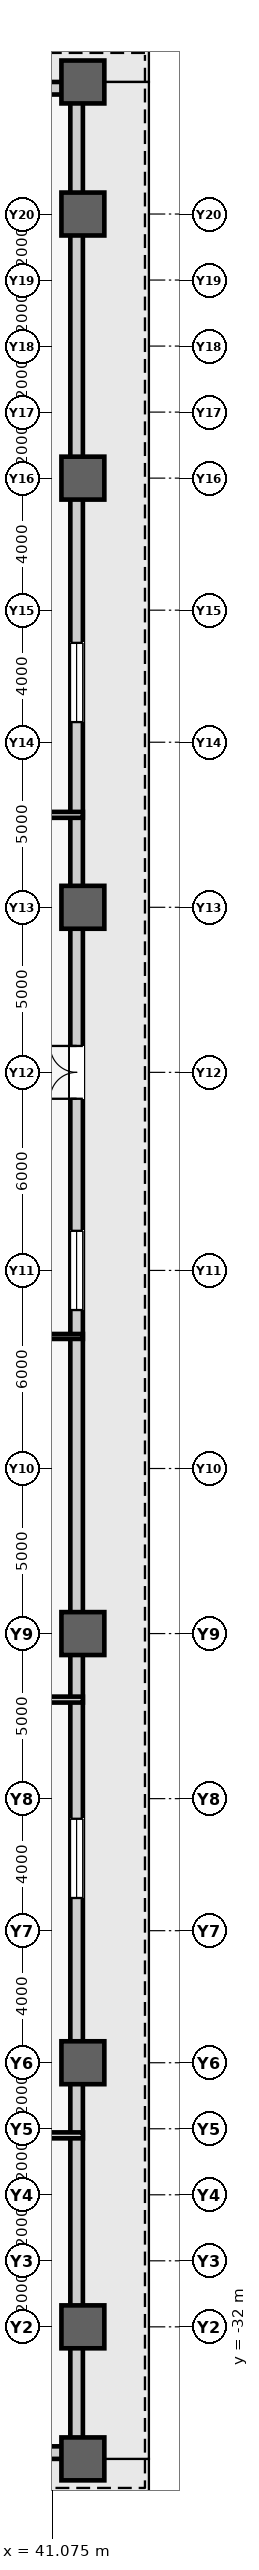
"""IFC4 building model, lengths in metres.
Left out: names, types, materials, properties, quantities, classifications, styles, units other than length and angle.
Written with IfcOpenShell. Run it as: python <this file> out.ifc"""

import sys

from ifc_helpers import new_model, si_unit, direction, frame, frame_2d, origin, origin_2d, place, context, subcontext, project, spatial, rectangle, extrude, source, transform, mapped, element, fill, save


model = new_model("IFC4")
c1 = context("Model", 3, precision=1e-05, world=origin(), true_north=direction((0.0, 1.0)))
c2 = subcontext(c1, "Body", "Model", "MODEL_VIEW")
j1 = project(units=[si_unit("LENGTHUNIT", "METRE"), si_unit("PLANEANGLEUNIT", "RADIAN")], contexts=[c1])
p1 = place(None, origin())
s1 = spatial("IfcSite", under=j1, at=p1, CompositionType="ELEMENT")
p2 = place(p1, origin())
s2 = spatial("IfcBuilding", under=s1, at=p2, CompositionType="ELEMENT")
p3 = place(p2, frame((0.0, 0.0, 12.0)))
s3 = spatial("IfcBuildingStorey", under=s2, at=p3, CompositionType="ELEMENT", Elevation=12.0)
m1 = source(origin(), c2, "Body", "SweptSolid", [
    extrude(rectangle(XDim=1.3, YDim=1.3, at=origin_2d()), origin(), (0.0, 0.0, 1.0), 5.4),
])
for number, where, z_axis, x_axis in (
    (1, (42.0, -36.0, 0.0), (0.0, 0.0, 1.0), (1.0, 0.0, 0.0)),
    (2, (42.0, -24.0, 0.0), (0.0, 0.0, 1.0), (1.0, 0.0, 0.0)),
    (3, (42.0, -11.0, 0.0), (0.0, 0.0, 1.0), (1.0, 0.0, 0.0)),
    (4, (42.0, 11.0, 0.0), (0.0, 0.0, 1.0), (1.0, 0.0, 0.0)),
    (5, (42.0, 24.0, 0.0), (0.0, 0.0, 1.0), (1.0, 0.0, 0.0)),
    (6, (42.0, 36.0, 0.0), (0.0, 0.0, 1.0), (1.0, 0.0, 0.0)),
    (7, (42.0, -32.0, 0.0), (0.0, 0.0, 1.0), (1.0, 0.0, 0.0)),
    (8, (42.0, 32.0, 0.0), (0.0, 0.0, 1.0), (1.0, 0.0, 0.0)),
):
    element("IfcColumn", number, at=place(p3, frame(where, z_axis=z_axis, x_axis=x_axis)), inside=s3, PredefinedType="COLUMN", context=c2, shape_type="MappedRepresentation", body=[
        mapped(m1, transform((0.0, 0.0, 0.0), scale=1.0)),
    ])
m2 = source(origin(), c2, "Body", "SweptSolid", [
    extrude(rectangle(XDim=32.0, YDim=0.38, at=frame_2d((16.0, 0.0))), origin(), (0.0, 0.0, 1.0), 3.28),
])
p4 = place(p3, frame((10.0, -35.81, 0.0), z_axis=(0.0, 0.0, 1.0), x_axis=(1.0, 0.0, 0.0)))
e9 = element("IfcWall", 9, at=p4, inside=s3, PredefinedType="STANDARD", context=c2, shape_type="MappedRepresentation", body=[
    mapped(m2, transform((0.0, 0.0, 0.0), scale=1.0)),
])
m3 = source(origin(), c2, "Body", "SweptSolid", [
    extrude(rectangle(XDim=2.4, YDim=2.56, at=frame_2d((1.2, 1.28))), frame((0.0, 0.2, 0.0), z_axis=(0.0, -1.0, 0.0), x_axis=(1.0, 0.0, 0.0)), (0.0, 0.0, 1.0), 0.4),
])
p5 = place(p4, frame((6.8, 0.0, 0.5)))
e10 = element("IfcOpeningElement", 10, at=p5, cuts=e9, PredefinedType="OPENING", context=c2, shape_type="MappedRepresentation", body=[
    mapped(m3, transform((0.0, 0.0, 0.0), scale=1.0)),
])
p6 = place(p4, frame((14.8, 0.0, 0.5)))
e11 = element("IfcOpeningElement", 11, at=p6, cuts=e9, PredefinedType="OPENING", context=c2, shape_type="MappedRepresentation", body=[
    mapped(m3, transform((0.0, 0.0, 0.0), scale=1.0)),
])
p7 = place(p3, frame((10.0, 35.81, 0.0), z_axis=(0.0, 0.0, 1.0), x_axis=(1.0, 0.0, 0.0)))
e12 = element("IfcWall", 12, at=p7, inside=s3, PredefinedType="STANDARD", context=c2, shape_type="MappedRepresentation", body=[
    mapped(m2, transform((0.0, 0.0, 0.0), scale=1.0)),
])
p8 = place(p7, frame((6.8, 0.0, 0.5)))
e13 = element("IfcOpeningElement", 13, at=p8, cuts=e12, PredefinedType="OPENING", context=c2, shape_type="MappedRepresentation", body=[
    mapped(m3, transform((0.0, 0.0, 0.0), scale=1.0)),
])
p9 = place(p7, frame((14.8, 0.0, 0.5)))
e14 = element("IfcOpeningElement", 14, at=p9, cuts=e12, PredefinedType="OPENING", context=c2, shape_type="MappedRepresentation", body=[
    mapped(m3, transform((0.0, 0.0, 0.0), scale=1.0)),
])
m4 = source(origin(), c2, "Body", "SweptSolid", [
    extrude(rectangle(XDim=71.24, YDim=0.38, at=frame_2d((35.62, 0.0))), origin(), (0.0, 0.0, 1.0), 3.28),
])
p10 = place(p3, frame((41.81, -35.62, 0.0), z_axis=(0.0, 0.0, 1.0), x_axis=(0.0, 1.0, 0.0)))
e15 = element("IfcWall", 15, at=p10, inside=s3, PredefinedType="STANDARD", context=c2, shape_type="MappedRepresentation", body=[
    mapped(m4, transform((0.0, 0.0, 0.0), scale=1.0)),
])
m5 = source(origin(), c2, "Body", "SweptSolid", [
    extrude(rectangle(XDim=1.6, YDim=2.25, at=frame_2d((0.8, 1.125))), frame((0.0, 0.2, 0.0), z_axis=(0.0, -1.0, 0.0), x_axis=(1.0, 0.0, 0.0)), (0.0, 0.0, 1.0), 0.4),
])
p11 = place(p10, frame((40.82, 0.0, 0.0)))
e16 = element("IfcOpeningElement", 16, at=p11, cuts=e15, PredefinedType="OPENING", context=c2, shape_type="MappedRepresentation", body=[
    mapped(m5, transform((0.0, 0.0, 0.0), scale=1.0)),
])
p12 = place(p10, frame((16.61, 0.0, 0.5)))
e17 = element("IfcOpeningElement", 17, at=p12, cuts=e15, PredefinedType="OPENING", context=c2, shape_type="MappedRepresentation", body=[
    mapped(m3, transform((0.0, 0.0, 0.0), scale=1.0)),
])
p13 = place(p10, frame((34.42, 0.0, 0.5)))
e18 = element("IfcOpeningElement", 18, at=p13, cuts=e15, PredefinedType="OPENING", context=c2, shape_type="MappedRepresentation", body=[
    mapped(m3, transform((0.0, 0.0, 0.0), scale=1.0)),
])
p14 = place(p10, frame((52.23, 0.0, 0.5)))
e19 = element("IfcOpeningElement", 19, at=p14, cuts=e15, PredefinedType="OPENING", context=c2, shape_type="MappedRepresentation", body=[
    mapped(m3, transform((0.0, 0.0, 0.0), scale=1.0)),
])
m6 = source(origin(), c2, "Body", "SweptSolid", [
    extrude(rectangle(XDim=84.0, YDim=0.18, at=frame_2d((42.0, 0.0))), origin(), (0.0, 0.0, 1.0), 5.08),
])
p15 = place(p3, frame((-42.0, -26.2, 0.0), z_axis=(0.0, 0.0, 1.0), x_axis=(1.0, 0.0, 0.0)))
e20 = element("IfcWall", 20, at=p15, inside=s3, PredefinedType="PARTITIONING", context=c2, shape_type="MappedRepresentation", body=[
    mapped(m6, transform((0.0, 0.0, 0.0), scale=1.0)),
])
m7 = source(origin(), c2, "Body", "SweptSolid", [
    extrude(rectangle(XDim=1.05, YDim=2.2, at=frame_2d((0.525, 1.1))), frame((0.0, 0.1, 0.0), z_axis=(0.0, -1.0, 0.0), x_axis=(1.0, 0.0, 0.0)), (0.0, 0.0, 1.0), 0.2),
])
p16 = place(p15, frame((21.725, 0.0, 0.0)))
e21 = element("IfcOpeningElement", 21, at=p16, cuts=e20, PredefinedType="OPENING", context=c2, shape_type="MappedRepresentation", body=[
    mapped(m7, transform((0.0, 0.0, 0.0), scale=1.0)),
])
p17 = place(p15, frame((43.475, 0.0, 0.0)))
e22 = element("IfcOpeningElement", 22, at=p17, cuts=e20, PredefinedType="OPENING", context=c2, shape_type="MappedRepresentation", body=[
    mapped(m7, transform((0.0, 0.0, 0.0), scale=1.0)),
])
p18 = place(p15, frame((63.225, 0.0, 0.0)))
e23 = element("IfcOpeningElement", 23, at=p18, cuts=e20, PredefinedType="OPENING", context=c2, shape_type="MappedRepresentation", body=[
    mapped(m7, transform((0.0, 0.0, 0.0), scale=1.0)),
])
p19 = place(p3, frame((-42.0, 13.8, 0.0), z_axis=(0.0, 0.0, 1.0), x_axis=(1.0, 0.0, 0.0)))
e24 = element("IfcWall", 24, at=p19, inside=s3, PredefinedType="PARTITIONING", context=c2, shape_type="MappedRepresentation", body=[
    mapped(m6, transform((0.0, 0.0, 0.0), scale=1.0)),
])
p20 = place(p19, frame((17.725, 0.0, 0.0)))
e25 = element("IfcOpeningElement", 25, at=p20, cuts=e24, PredefinedType="OPENING", context=c2, shape_type="MappedRepresentation", body=[
    mapped(m7, transform((0.0, 0.0, 0.0), scale=1.0)),
])
p21 = place(p19, frame((35.475, 0.0, 0.0)))
e26 = element("IfcOpeningElement", 26, at=p21, cuts=e24, PredefinedType="OPENING", context=c2, shape_type="MappedRepresentation", body=[
    mapped(m7, transform((0.0, 0.0, 0.0), scale=1.0)),
])
p22 = place(p19, frame((59.225, 0.0, 0.0)))
e27 = element("IfcOpeningElement", 27, at=p22, cuts=e24, PredefinedType="OPENING", context=c2, shape_type="MappedRepresentation", body=[
    mapped(m7, transform((0.0, 0.0, 0.0), scale=1.0)),
])
m8 = source(origin(), c2, "Body", "SweptSolid", [
    extrude(rectangle(XDim=23.8, YDim=0.18, at=frame_2d((11.9, 0.0))), origin(), (0.0, 0.0, 1.0), 5.08),
])
p23 = place(p3, frame((18.2, -13.0, 0.0), z_axis=(0.0, 0.0, 1.0), x_axis=(1.0, 0.0, 0.0)))
e28 = element("IfcWall", 28, at=p23, inside=s3, PredefinedType="PARTITIONING", context=c2, shape_type="MappedRepresentation", body=[
    mapped(m8, transform((0.0, 0.0, 0.0), scale=1.0)),
])
m9 = source(origin(), c2, "Body", "SweptSolid", [
    extrude(rectangle(XDim=23.8, YDim=0.15, at=frame_2d((11.9, 0.0))), origin(), (0.0, 0.0, 1.0), 5.08),
])
p24 = place(p3, frame((18.2, -2.0, 0.0), z_axis=(0.0, 0.0, 1.0), x_axis=(1.0, 0.0, 0.0)))
e29 = element("IfcWall", 29, at=p24, inside=s3, PredefinedType="PARTITIONING", context=c2, shape_type="MappedRepresentation", body=[
    mapped(m9, transform((0.0, 0.0, 0.0), scale=1.0)),
])
m10 = source(origin(), c2, "Body", "SweptSolid", [
    extrude(rectangle(XDim=1.6, YDim=2.25, at=frame_2d((0.8, 1.125))), frame((0.0, 0.025, 0.0), z_axis=(0.0, -1.0, 0.0), x_axis=(1.0, 0.0, 0.0)), (0.0, 0.0, 1.0), 0.05),
])
p25 = place(p11, origin())
e30 = element("IfcDoor", 30, at=p25, inside=s3, OperationType="DOUBLE_DOOR_SINGLE_SWING", PredefinedType="DOOR", context=c2, shape_type="MappedRepresentation", body=[
    mapped(m10, transform((0.0, 0.0, 0.0), scale=1.0)),
])
fill(e16, e30)
m11 = source(origin(), c2, "Body", "SweptSolid", [
    extrude(rectangle(XDim=2.4, YDim=2.56, at=frame_2d((1.2, 1.28))), frame((0.0, 0.03, 0.0), z_axis=(0.0, -1.0, 0.0), x_axis=(1.0, 0.0, 0.0)), (0.0, 0.0, 1.0), 0.06),
])
p26 = place(p12, origin())
e31 = element("IfcWindow", 31, at=p26, inside=s3, PartitioningType="SINGLE_PANEL", PredefinedType="WINDOW", context=c2, shape_type="MappedRepresentation", body=[
    mapped(m11, transform((0.0, 0.0, 0.0), scale=1.0)),
])
fill(e17, e31)
p27 = place(p13, origin())
e32 = element("IfcWindow", 32, at=p27, inside=s3, PartitioningType="SINGLE_PANEL", PredefinedType="WINDOW", context=c2, shape_type="MappedRepresentation", body=[
    mapped(m11, transform((0.0, 0.0, 0.0), scale=1.0)),
])
fill(e18, e32)
p28 = place(p14, origin())
e33 = element("IfcWindow", 33, at=p28, inside=s3, PartitioningType="SINGLE_PANEL", PredefinedType="WINDOW", context=c2, shape_type="MappedRepresentation", body=[
    mapped(m11, transform((0.0, 0.0, 0.0), scale=1.0)),
])
fill(e19, e33)
save(model, sys.argv[1])
